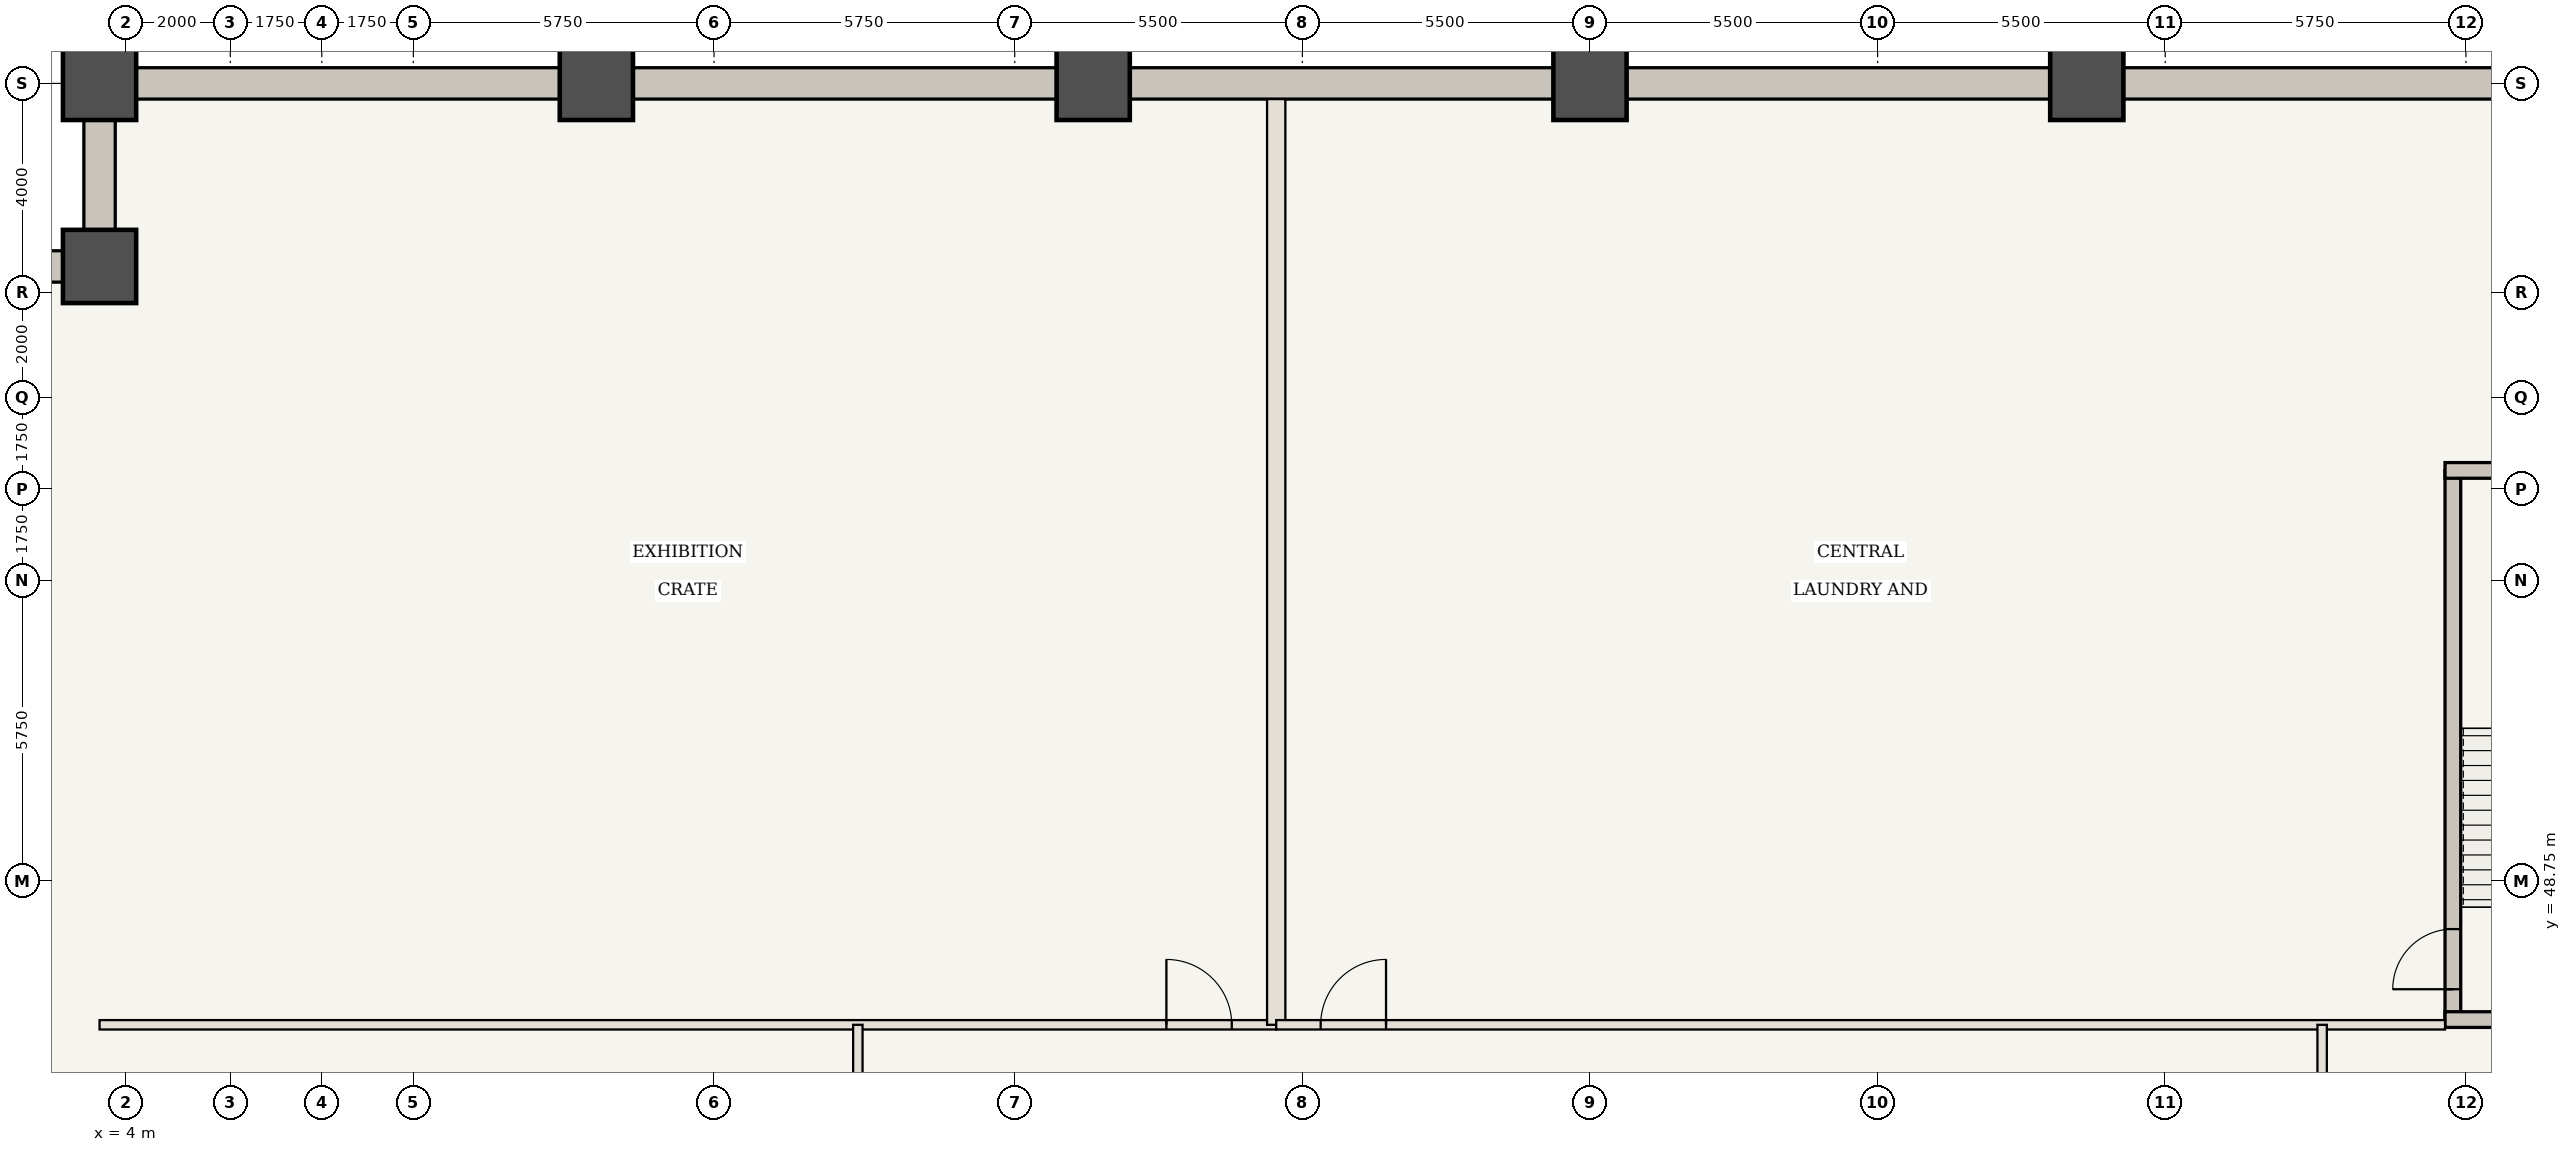
"""IFC4 building model, lengths in metres.
Left out: names, types, materials, properties, quantities, classifications, styles, units other than length and angle.
Written with IfcOpenShell. Run it as: python <this file> out.ifc"""

import sys

from ifc_helpers import new_model, si_unit, direction, frame, frame_2d, origin, origin_2d, place, context, subcontext, project, spatial, rectangle, extrude, element, fill, save


model = new_model("IFC4")
c1 = context("Model", 3, precision=1e-05, world=origin(), true_north=direction((0.0, 1.0)))
c2 = subcontext(c1, "Body", "Model", "MODEL_VIEW")
j1 = project(units=[si_unit("LENGTHUNIT", "METRE"), si_unit("PLANEANGLEUNIT", "RADIAN")], contexts=[c1])
p1 = place(None, origin())
s1 = spatial("IfcSite", under=j1, at=p1, CompositionType="ELEMENT")
p2 = place(p1, origin())
s2 = spatial("IfcBuilding", under=s1, at=p2, CompositionType="ELEMENT")
p3 = place(p2, frame((0.0, 0.0, -4.55)))
s3 = spatial("IfcBuildingStorey", under=s2, at=p3, CompositionType="ELEMENT", Elevation=-4.55)
p4 = place(p3, frame((60.5, 64.0, 0.0), z_axis=(0.0, 0.0, 1.0), x_axis=(-1.0, 0.0, 0.0)))
e1 = element("IfcWall", 1, at=p4, inside=s3, PredefinedType="USERDEFINED", context=c2, shape_type="SweptSolid", body=[
    extrude(rectangle(XDim=57.0, YDim=0.6, at=frame_2d((28.5, 0.0))), origin(), (0.0, 0.0, 1.0), 4.55),
])
for number, where, z_axis, x_axis in (
    (2, (3.5, 64.0, 0.0), (0.0, 0.0, 1.0), (0.0, -1.0, 0.0)),
    (3, (3.5, 60.5, 0.0), (0.0, 0.0, 1.0), (-1.0, 0.0, 0.0)),
):
    element("IfcWall", number, at=place(p3, frame(where, z_axis=z_axis, x_axis=x_axis)), inside=s3, PredefinedType="USERDEFINED", context=c2, shape_type="SweptSolid", body=[
        extrude(rectangle(XDim=3.5, YDim=0.6, at=frame_2d((1.75, 0.0))), origin(), (0.0, 0.0, 1.0), 4.55),
    ])
for number, where, z_axis, x_axis in (
    (4, (3.5, 64.0, 0.0), (0.0, 0.0, 1.0), (1.0, 0.0, 0.0)),
    (5, (3.5, 60.5, 0.0), (0.0, 0.0, 1.0), (1.0, 0.0, 0.0)),
    (6, (13.0, 64.0, 0.0), (0.0, 0.0, 1.0), (1.0, 0.0, 0.0)),
    (7, (22.5, 64.0, 0.0), (0.0, 0.0, 1.0), (1.0, 0.0, 0.0)),
    (8, (32.0, 64.0, 0.0), (0.0, 0.0, 1.0), (1.0, 0.0, 0.0)),
    (9, (41.5, 64.0, 0.0), (0.0, 0.0, 1.0), (1.0, 0.0, 0.0)),
):
    element("IfcColumn", number, at=place(p3, frame(where, z_axis=z_axis, x_axis=x_axis)), inside=s3, PredefinedType="COLUMN", context=c2, shape_type="SweptSolid", body=[
        extrude(rectangle(XDim=1.4, YDim=1.4, at=origin_2d()), origin(), (0.0, 0.0, 1.0), 4.55),
    ])
p5 = place(p3, frame((48.5, 46.1, 0.0), z_axis=(0.0, 0.0, 1.0), x_axis=(0.0, 1.0, 0.0)))
e10 = element("IfcWall", 10, at=p5, inside=s3, PredefinedType="SHEAR", context=c2, shape_type="SweptSolid", body=[
    extrude(rectangle(XDim=10.5, YDim=0.3, at=frame_2d((5.25, 0.0))), origin(), (0.0, 0.0, 1.0), 4.23),
])
p6 = place(p5, frame((0.58, 0.0, 0.0)))
e11 = element("IfcOpeningElement", 11, at=p6, cuts=e10, PredefinedType="OPENING", context=c2, shape_type="SweptSolid", body=[
    extrude(rectangle(XDim=1.15, YDim=2.15, at=frame_2d((0.575, 1.075))), frame((0.0, 0.16, 0.0), z_axis=(0.0, -1.0, 0.0), x_axis=(1.0, 0.0, 0.0)), (0.0, 0.0, 1.0), 0.32),
])
for number, where, z_axis, x_axis in (
    (12, (48.35, 46.1, 0.0), (0.0, 0.0, 1.0), (1.0, 0.0, 0.0)),
    (13, (48.35, 56.6, 0.0), (0.0, 0.0, 1.0), (1.0, 0.0, 0.0)),
):
    element("IfcWall", number, at=place(p3, frame(where, z_axis=z_axis, x_axis=x_axis)), inside=s3, PredefinedType="SHEAR", context=c2, shape_type="SweptSolid", body=[
        extrude(rectangle(XDim=4.75, YDim=0.3, at=frame_2d((2.375, 0.0))), origin(), (0.0, 0.0, 1.0), 4.23),
    ])
p7 = place(p3, frame((3.5, 46.0, 0.0), z_axis=(0.0, 0.0, 1.0), x_axis=(1.0, 0.0, 0.0)))
e14 = element("IfcWall", 14, at=p7, inside=s3, PredefinedType="STANDARD", context=c2, shape_type="SweptSolid", body=[
    extrude(rectangle(XDim=22.5, YDim=0.18, at=frame_2d((11.25, 0.0))), origin(), (0.0, 0.0, 1.0), 4.23),
])
p8 = place(p7, frame((20.4, 0.0, 0.0)))
e15 = element("IfcOpeningElement", 15, at=p8, cuts=e14, PredefinedType="OPENING", context=c2, shape_type="SweptSolid", body=[
    extrude(rectangle(XDim=1.25, YDim=2.2, at=frame_2d((0.625, 1.1))), frame((0.0, 0.1, 0.0), z_axis=(0.0, -1.0, 0.0), x_axis=(1.0, 0.0, 0.0)), (0.0, 0.0, 1.0), 0.2),
])
p9 = place(p3, frame((26.0, 46.0, 0.0), z_axis=(0.0, 0.0, 1.0), x_axis=(0.0, 1.0, 0.0)))
e16 = element("IfcWall", 16, at=p9, inside=s3, PredefinedType="STANDARD", context=c2, shape_type="SweptSolid", body=[
    extrude(rectangle(XDim=17.7, YDim=0.35, at=frame_2d((8.85, 0.0))), origin(), (0.0, 0.0, 1.0), 4.23),
])
p10 = place(p3, frame((26.0, 46.0, 0.0), z_axis=(0.0, 0.0, 1.0), x_axis=(1.0, 0.0, 0.0)))
e17 = element("IfcWall", 17, at=p10, inside=s3, PredefinedType="STANDARD", context=c2, shape_type="SweptSolid", body=[
    extrude(rectangle(XDim=22.35, YDim=0.18, at=frame_2d((11.175, 0.0))), origin(), (0.0, 0.0, 1.0), 4.23),
])
p11 = place(p10, frame((0.85, 0.0, 0.0)))
e18 = element("IfcOpeningElement", 18, at=p11, cuts=e17, PredefinedType="OPENING", context=c2, shape_type="SweptSolid", body=[
    extrude(rectangle(XDim=1.25, YDim=2.2, at=frame_2d((0.625, 1.1))), frame((0.0, 0.1, 0.0), z_axis=(0.0, -1.0, 0.0), x_axis=(1.0, 0.0, 0.0)), (0.0, 0.0, 1.0), 0.2),
])
p12 = place(p3, frame((18.0, 18.0, 0.0), z_axis=(0.0, 0.0, 1.0), x_axis=(0.0, 1.0, 0.0)))
e19 = element("IfcWall", 19, at=p12, inside=s3, PredefinedType="STANDARD", context=c2, shape_type="SweptSolid", body=[
    extrude(rectangle(XDim=28.0, YDim=0.18, at=frame_2d((14.0, 0.0))), origin(), (0.0, 0.0, 1.0), 4.23),
])
p13 = place(p12, frame((14.95, 0.0, 0.0)))
e20 = element("IfcOpeningElement", 20, at=p13, cuts=e19, PredefinedType="OPENING", context=c2, shape_type="SweptSolid", body=[
    extrude(rectangle(XDim=1.25, YDim=2.2, at=frame_2d((0.625, 1.1))), frame((0.0, 0.1, 0.0), z_axis=(0.0, -1.0, 0.0), x_axis=(1.0, 0.0, 0.0)), (0.0, 0.0, 1.0), 0.2),
])
p14 = place(p3, frame((46.0, 18.0, 0.0), z_axis=(0.0, 0.0, 1.0), x_axis=(0.0, 1.0, 0.0)))
e21 = element("IfcWall", 21, at=p14, inside=s3, PredefinedType="STANDARD", context=c2, shape_type="SweptSolid", body=[
    extrude(rectangle(XDim=28.0, YDim=0.18, at=frame_2d((14.0, 0.0))), origin(), (0.0, 0.0, 1.0), 4.23),
])
p15 = place(p14, frame((14.95, 0.0, 0.0)))
e22 = element("IfcOpeningElement", 22, at=p15, cuts=e21, PredefinedType="OPENING", context=c2, shape_type="SweptSolid", body=[
    extrude(rectangle(XDim=1.25, YDim=2.2, at=frame_2d((0.625, 1.1))), frame((0.0, 0.1, 0.0), z_axis=(0.0, -1.0, 0.0), x_axis=(1.0, 0.0, 0.0)), (0.0, 0.0, 1.0), 0.2),
])
p16 = place(p6, origin())
e23 = element("IfcDoor", 23, at=p16, inside=s3, OperationType="SINGLE_SWING_LEFT", PredefinedType="DOOR", context=c2, shape_type="SweptSolid", body=[
    extrude(rectangle(XDim=1.15, YDim=2.15, at=frame_2d((0.575, 1.075))), frame((0.0, 0.025, 0.0), z_axis=(0.0, -1.0, 0.0), x_axis=(1.0, 0.0, 0.0)), (0.0, 0.0, 1.0), 0.05),
])
fill(e11, e23)
p17 = place(p8, origin())
e24 = element("IfcDoor", 24, at=p17, inside=s3, OperationType="SINGLE_SWING_LEFT", PredefinedType="DOOR", context=c2, shape_type="SweptSolid", body=[
    extrude(rectangle(XDim=1.25, YDim=2.2, at=frame_2d((0.625, 1.1))), frame((0.0, 0.025, 0.0), z_axis=(0.0, -1.0, 0.0), x_axis=(1.0, 0.0, 0.0)), (0.0, 0.0, 1.0), 0.05),
])
fill(e15, e24)
p18 = place(p11, origin())
e25 = element("IfcDoor", 25, at=p18, inside=s3, OperationType="SINGLE_SWING_RIGHT", PredefinedType="DOOR", context=c2, shape_type="SweptSolid", body=[
    extrude(rectangle(XDim=1.25, YDim=2.2, at=frame_2d((0.625, 1.1))), frame((0.0, 0.025, 0.0), z_axis=(0.0, -1.0, 0.0), x_axis=(1.0, 0.0, 0.0)), (0.0, 0.0, 1.0), 0.05),
])
fill(e18, e25)
save(model, sys.argv[1])
